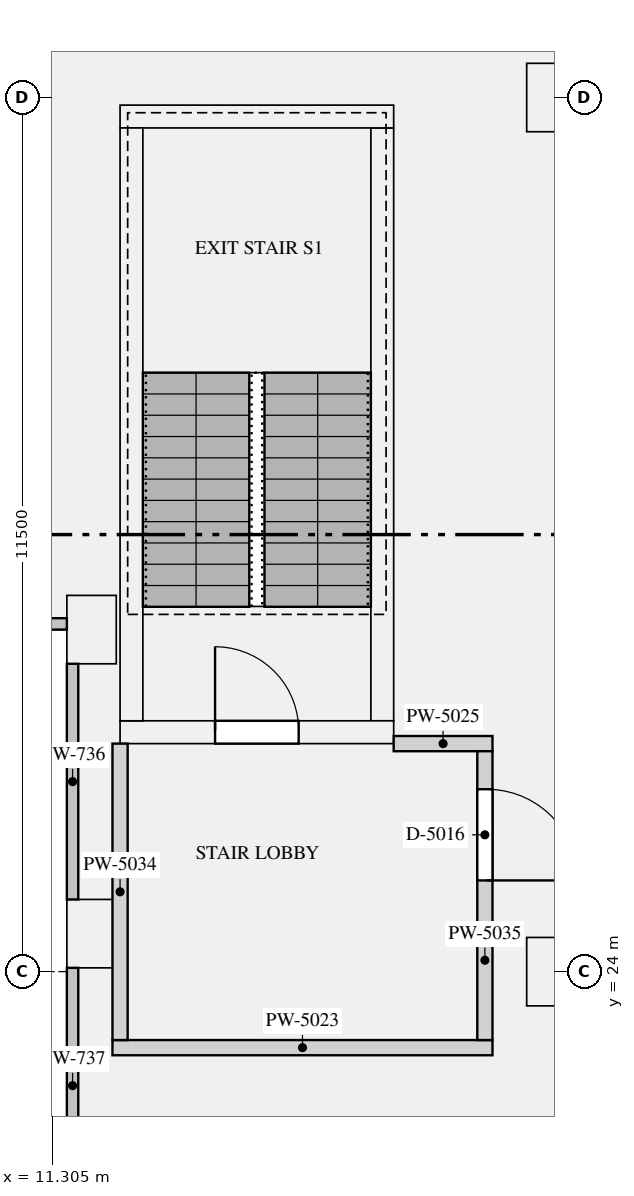
"""IFC4 building model, lengths in metres.
Left out: names, types, materials, properties, quantities, classifications, styles, units other than length and angle.
Written with IfcOpenShell. Run it as: python <this file> out.ifc"""

import sys

from ifc_helpers import new_model, si_unit, direction, frame, frame_2d, origin, origin_2d, place, context, subcontext, project, spatial, rectangle, extrude, element, fill, save


model = new_model("IFC4")
c1 = context("Model", 3, precision=1e-05, world=origin(), true_north=direction((0.0, 1.0)))
c2 = subcontext(c1, "Body", "Model", "MODEL_VIEW")
j1 = project(units=[si_unit("LENGTHUNIT", "METRE"), si_unit("PLANEANGLEUNIT", "RADIAN")], contexts=[c1])
p1 = place(None, origin())
s1 = spatial("IfcSite", under=j1, at=p1, CompositionType="ELEMENT")
p2 = place(p1, origin())
s2 = spatial("IfcBuilding", under=s1, at=p2, CompositionType="ELEMENT")
p3 = place(p2, frame((0.0, 0.0, 240.0)))
s3 = spatial("IfcBuildingStorey", under=s2, at=p3, CompositionType="ELEMENT", Elevation=240.0)
for number, where, z_axis, x_axis in (
    (1, (11.825, 28.5, 0.0), (0.0, 0.0, 1.0), (0.0, -1.0, 0.0)),
    (2, (11.825, 24.5, 0.0), (0.0, 0.0, 1.0), (0.0, -1.0, 0.0)),
):
    element("IfcColumn", number, at=place(p3, frame(where, z_axis=z_axis, x_axis=x_axis)), inside=s3, PredefinedType="USERDEFINED", context=c2, shape_type="SweptSolid", body=[
        extrude(rectangle(XDim=0.9, YDim=0.65, at=origin_2d()), origin(), (0.0, 0.0, 1.0), 4.2),
    ])
for number, where, z_axis, x_axis in (
    (3, (18.0, 24.0, 0.0), (0.0, 0.0, 1.0), (1.0, 0.0, 0.0)),
    (4, (18.0, 35.5, 0.0), (0.0, 0.0, 1.0), (1.0, 0.0, 0.0)),
):
    element("IfcColumn", number, at=place(p3, frame(where, z_axis=z_axis, x_axis=x_axis)), inside=s3, PredefinedType="COLUMN", context=c2, shape_type="SweptSolid", body=[
        extrude(rectangle(XDim=0.9, YDim=0.9, at=origin_2d()), origin(), (0.0, 0.0, 1.0), 4.2),
    ])
p4 = place(p3, frame((12.2, 27.15, 0.0), z_axis=(0.0, 0.0, 1.0), x_axis=(1.0, 0.0, 0.0)))
e5 = element("IfcWall", 5, at=p4, inside=s3, PredefinedType="SHEAR", context=c2, shape_type="SweptSolid", body=[
    extrude(rectangle(XDim=3.6, YDim=0.3, at=frame_2d((1.8, 0.0))), origin(), (0.0, 0.0, 1.0), 4.2),
])
p5 = place(p4, frame((1.25, 0.0, 0.0)))
e6 = element("IfcOpeningElement", 6, at=p5, cuts=e5, PredefinedType="OPENING", context=c2, shape_type="SweptSolid", body=[
    extrude(rectangle(XDim=1.1, YDim=2.1, at=frame_2d((0.55, 1.05))), frame((0.0, 0.16, 0.0), z_axis=(0.0, -1.0, 0.0), x_axis=(1.0, 0.0, 0.0)), (0.0, 0.0, 1.0), 0.32),
])
p6 = place(p3, frame((12.2, 35.25, 0.0), z_axis=(0.0, 0.0, 1.0), x_axis=(1.0, 0.0, 0.0)))
e7 = element("IfcWall", 7, at=p6, inside=s3, PredefinedType="SHEAR", context=c2, shape_type="SweptSolid", body=[
    extrude(rectangle(XDim=3.6, YDim=0.3, at=frame_2d((1.8, 0.0))), origin(), (0.0, 0.0, 1.0), 4.2),
])
for number, where, z_axis, x_axis in (
    (8, (12.35, 27.3, 0.0), (0.0, 0.0, 1.0), (0.0, 1.0, 0.0)),
    (9, (15.65, 27.3, 0.0), (0.0, 0.0, 1.0), (0.0, 1.0, 0.0)),
):
    element("IfcWall", number, at=place(p3, frame(where, z_axis=z_axis, x_axis=x_axis)), inside=s3, PredefinedType="SHEAR", context=c2, shape_type="SweptSolid", body=[
        extrude(rectangle(XDim=7.8, YDim=0.3, at=frame_2d((3.9, 0.0))), origin(), (0.0, 0.0, 1.0), 4.2),
    ])
p7 = place(p3, frame((12.1, 23.0, 0.0), z_axis=(0.0, 0.0, 1.0), x_axis=(1.0, 0.0, 0.0)))
e10 = element("IfcWall", 10, at=p7, inside=s3, PredefinedType="PARTITIONING", context=c2, shape_type="SweptSolid", body=[
    extrude(rectangle(XDim=5.0, YDim=0.2, at=frame_2d((2.5, 0.0))), origin(), (0.0, 0.0, 1.0), 3.85),
])
p8 = place(p3, frame((15.8, 27.0, 0.0), z_axis=(0.0, 0.0, 1.0), x_axis=(1.0, 0.0, 0.0)))
e11 = element("IfcWall", 11, at=p8, inside=s3, PredefinedType="PARTITIONING", context=c2, shape_type="SweptSolid", body=[
    extrude(rectangle(XDim=1.3, YDim=0.2, at=frame_2d((0.65, 0.0))), origin(), (0.0, 0.0, 1.0), 3.85),
])
p9 = place(p3, frame((12.2, 23.1, 0.0), z_axis=(0.0, 0.0, 1.0), x_axis=(0.0, 1.0, 0.0)))
e12 = element("IfcWall", 12, at=p9, inside=s3, PredefinedType="PARTITIONING", context=c2, shape_type="SweptSolid", body=[
    extrude(rectangle(XDim=3.9, YDim=0.2, at=frame_2d((1.95, 0.0))), origin(), (0.0, 0.0, 1.0), 3.85),
])
p10 = place(p3, frame((17.0, 23.1, 0.0), z_axis=(0.0, 0.0, 1.0), x_axis=(0.0, 1.0, 0.0)))
e13 = element("IfcWall", 13, at=p10, inside=s3, PredefinedType="PARTITIONING", context=c2, shape_type="SweptSolid", body=[
    extrude(rectangle(XDim=3.8, YDim=0.2, at=frame_2d((1.9, 0.0))), origin(), (0.0, 0.0, 1.0), 3.85),
])
p11 = place(p10, frame((2.1, 0.0, 0.0)))
e14 = element("IfcOpeningElement", 14, at=p11, cuts=e13, PredefinedType="OPENING", context=c2, shape_type="SweptSolid", body=[
    extrude(rectangle(XDim=1.2, YDim=2.1, at=frame_2d((0.6, 1.05))), frame((0.0, 0.11, 0.0), z_axis=(0.0, -1.0, 0.0), x_axis=(1.0, 0.0, 0.0)), (0.0, 0.0, 1.0), 0.22),
])
p12 = place(p5, origin())
e15 = element("IfcDoor", 15, at=p12, inside=s3, OperationType="SINGLE_SWING_LEFT", PredefinedType="DOOR", context=c2, shape_type="SweptSolid", body=[
    extrude(rectangle(XDim=1.1, YDim=2.1, at=frame_2d((0.55, 1.05))), frame((0.0, 0.025, 0.0), z_axis=(0.0, -1.0, 0.0), x_axis=(1.0, 0.0, 0.0)), (0.0, 0.0, 1.0), 0.05),
])
fill(e6, e15)
p13 = place(p11, frame((1.2, 0.0, 0.0), z_axis=(0.0, 0.0, 1.0), x_axis=(-1.0, 0.0, 0.0)))
e16 = element("IfcDoor", 16, at=p13, inside=s3, OperationType="SINGLE_SWING_RIGHT", PredefinedType="DOOR", context=c2, shape_type="SweptSolid", body=[
    extrude(rectangle(XDim=1.2, YDim=2.1, at=frame_2d((0.6, 1.05))), frame((0.0, 0.025, 0.0), z_axis=(0.0, -1.0, 0.0), x_axis=(1.0, 0.0, 0.0)), (0.0, 0.0, 1.0), 0.05),
])
fill(e14, e16)
save(model, sys.argv[1])
